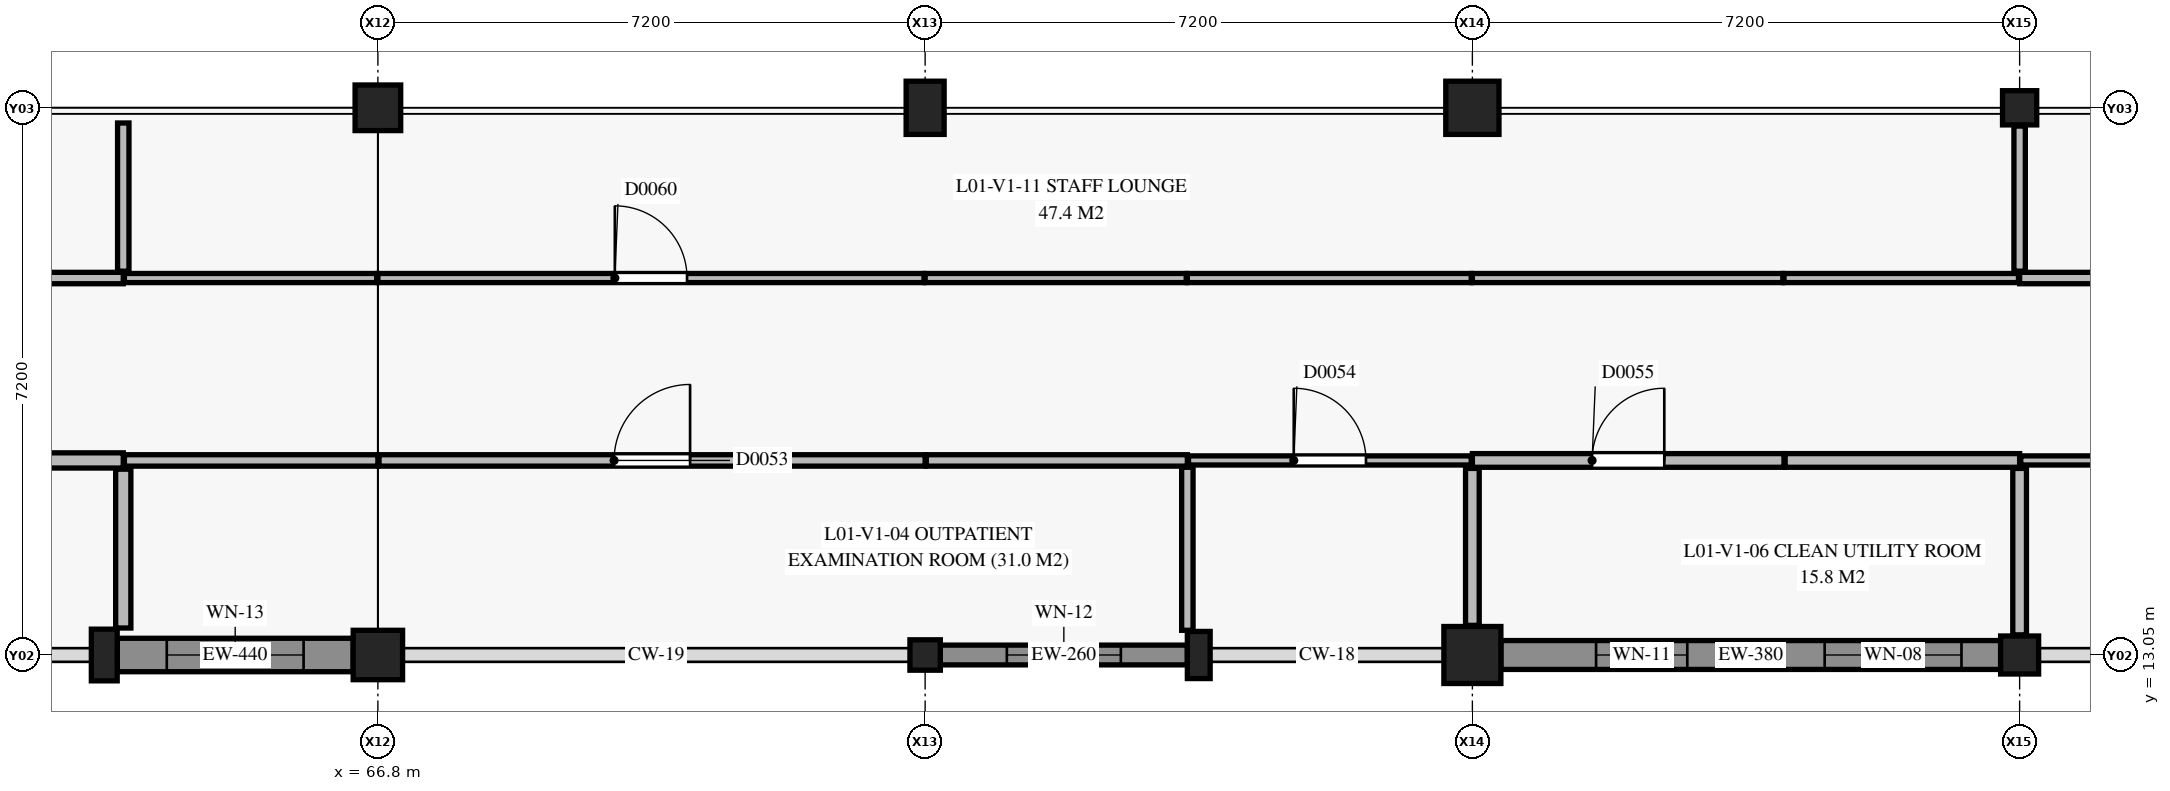
"""IFC4 building model, lengths in metres.
Left out: names, types, materials, properties, quantities, classifications, styles, units other than length and angle.
Written with IfcOpenShell. Run it as: python <this file> out.ifc"""

import sys

from ifc_helpers import new_model, si_unit, direction, frame, frame_2d, origin, origin_2d, place, context, subcontext, project, spatial, rectangle, extrude, element, fill, save


model = new_model("IFC4")
c1 = context("Model", 3, precision=1e-05, world=origin(), true_north=direction((0.0, 1.0)))
c2 = subcontext(c1, "Body", "Model", "MODEL_VIEW")
j1 = project(units=[si_unit("LENGTHUNIT", "METRE"), si_unit("PLANEANGLEUNIT", "RADIAN")], contexts=[c1])
p1 = place(None, origin())
s1 = spatial("IfcSite", under=j1, at=p1, CompositionType="ELEMENT")
p2 = place(p1, origin())
s2 = spatial("IfcBuilding", under=s1, at=p2, CompositionType="ELEMENT")
p3 = place(p2, frame((0.0, 0.0, 4.8)))
s3 = spatial("IfcBuildingStorey", under=s2, at=p3, CompositionType="ELEMENT", Elevation=4.8)
p4 = place(p3, frame((66.8, 13.05, 0.0), z_axis=(0.0, 0.0, 1.0), x_axis=(1.0, 0.0, 0.0)))
e1 = element("IfcColumn", 1, at=p4, inside=s3, PredefinedType="COLUMN", context=c2, shape_type="SweptSolid", body=[
    extrude(rectangle(XDim=0.65, YDim=0.65, at=origin_2d()), origin(), (0.0, 0.0, 1.0), 4.36),
])
p5 = place(p3, frame((66.8, 20.25, 0.0), z_axis=(0.0, 0.0, 1.0), x_axis=(1.0, 0.0, 0.0)))
e2 = element("IfcColumn", 2, at=p5, inside=s3, PredefinedType="COLUMN", context=c2, shape_type="SweptSolid", body=[
    extrude(rectangle(XDim=0.6, YDim=0.6, at=origin_2d()), origin(), (0.0, 0.0, 1.0), 4.05),
])
p6 = place(p3, frame((74.0, 13.05, 0.0), z_axis=(0.0, 0.0, 1.0), x_axis=(1.0, 0.0, 0.0)))
e3 = element("IfcColumn", 3, at=p6, inside=s3, PredefinedType="COLUMN", context=c2, shape_type="SweptSolid", body=[
    extrude(rectangle(XDim=0.4, YDim=0.4, at=origin_2d()), origin(), (0.0, 0.0, 1.0), 4.36),
])
p7 = place(p3, frame((74.0, 20.25, 0.0), z_axis=(0.0, 0.0, 1.0), x_axis=(1.0, 0.0, 0.0)))
e4 = element("IfcColumn", 4, at=p7, inside=s3, PredefinedType="COLUMN", context=c2, shape_type="SweptSolid", body=[
    extrude(rectangle(XDim=0.5, YDim=0.7, at=origin_2d()), origin(), (0.0, 0.0, 1.0), 4.05),
])
p8 = place(p3, frame((81.2, 13.05, 0.0), z_axis=(0.0, 0.0, 1.0), x_axis=(1.0, 0.0, 0.0)))
e5 = element("IfcColumn", 5, at=p8, inside=s3, PredefinedType="COLUMN", context=c2, shape_type="SweptSolid", body=[
    extrude(rectangle(XDim=0.75, YDim=0.75, at=origin_2d()), origin(), (0.0, 0.0, 1.0), 4.36),
])
p9 = place(p3, frame((81.2, 20.25, 0.0), z_axis=(0.0, 0.0, 1.0), x_axis=(1.0, 0.0, 0.0)))
e6 = element("IfcColumn", 6, at=p9, inside=s3, PredefinedType="COLUMN", context=c2, shape_type="SweptSolid", body=[
    extrude(rectangle(XDim=0.7, YDim=0.7, at=origin_2d()), origin(), (0.0, 0.0, 1.0), 4.05),
])
p10 = place(p3, frame((88.4, 13.05, 0.0), z_axis=(0.0, 0.0, 1.0), x_axis=(1.0, 0.0, 0.0)))
e7 = element("IfcColumn", 7, at=p10, inside=s3, PredefinedType="COLUMN", context=c2, shape_type="SweptSolid", body=[
    extrude(rectangle(XDim=0.5, YDim=0.5, at=origin_2d()), origin(), (0.0, 0.0, 1.0), 4.36),
])
p11 = place(p3, frame((88.4, 20.25, 0.0), z_axis=(0.0, 0.0, 1.0), x_axis=(1.0, 0.0, 0.0)))
e8 = element("IfcColumn", 8, at=p11, inside=s3, PredefinedType="COLUMN", context=c2, shape_type="SweptSolid", body=[
    extrude(rectangle(XDim=0.45, YDim=0.45, at=origin_2d()), origin(), (0.0, 0.0, 1.0), 4.05),
])
p12 = place(p3, frame((63.2, 13.05, 0.0), z_axis=(0.0, 0.0, 1.0), x_axis=(1.0, 0.0, 0.0)))
e9 = element("IfcColumn", 9, at=p12, inside=s3, PredefinedType="PILASTER", context=c2, shape_type="SweptSolid", body=[
    extrude(rectangle(XDim=0.34, YDim=0.68, at=origin_2d()), origin(), (0.0, 0.0, 1.0), 4.2),
])
p13 = place(p3, frame((77.6, 13.05, 0.0), z_axis=(0.0, 0.0, 1.0), x_axis=(1.0, 0.0, 0.0)))
e10 = element("IfcColumn", 10, at=p13, inside=s3, PredefinedType="PILASTER", context=c2, shape_type="SweptSolid", body=[
    extrude(rectangle(XDim=0.3, YDim=0.62, at=origin_2d()), origin(), (0.0, 0.0, 1.0), 4.2),
])
p14 = place(p3, frame((88.15, 13.05, 0.0), z_axis=(0.0, 0.0, 1.0), x_axis=(-1.0, 0.0, 0.0)))
e11 = element("IfcWall", 11, at=p14, inside=s3, PredefinedType="USERDEFINED", context=c2, shape_type="SweptSolid", body=[
    extrude(rectangle(XDim=6.575, YDim=0.38, at=frame_2d((3.288, 0.0))), origin(), (0.0, 0.0, 1.0), 3.38),
])
p15 = place(p14, frame((0.515, 0.0, 0.9)))
e12 = element("IfcOpeningElement", 12, at=p15, cuts=e11, PredefinedType="OPENING", context=c2, shape_type="SweptSolid", body=[
    extrude(rectangle(XDim=1.8, YDim=1.8, at=frame_2d((0.9, 0.9))), frame((0.0, 0.2, 0.0), z_axis=(0.0, -1.0, 0.0), x_axis=(1.0, 0.0, 0.0)), (0.0, 0.0, 1.0), 0.4),
])
p16 = place(p14, frame((4.123, 0.0, 0.9)))
e13 = element("IfcOpeningElement", 13, at=p16, cuts=e11, PredefinedType="OPENING", context=c2, shape_type="SweptSolid", body=[
    extrude(rectangle(XDim=1.2, YDim=1.5, at=frame_2d((0.6, 0.75))), frame((0.0, 0.2, 0.0), z_axis=(0.0, -1.0, 0.0), x_axis=(1.0, 0.0, 0.0)), (0.0, 0.0, 1.0), 0.4),
])
p17 = place(p3, frame((77.45, 13.05, 0.0), z_axis=(0.0, 0.0, 1.0), x_axis=(-1.0, 0.0, 0.0)))
e14 = element("IfcWall", 14, at=p17, inside=s3, PredefinedType="SOLIDWALL", context=c2, shape_type="SweptSolid", body=[
    extrude(rectangle(XDim=3.25, YDim=0.26, at=frame_2d((1.625, 0.0))), origin(), (0.0, 0.0, 1.0), 3.38),
])
p18 = place(p17, frame((0.875, 0.0, 0.9)))
e15 = element("IfcOpeningElement", 15, at=p18, cuts=e14, PredefinedType="OPENING", context=c2, shape_type="SweptSolid", body=[
    extrude(rectangle(XDim=1.5, YDim=1.5, at=frame_2d((0.75, 0.75))), frame((0.0, 0.14, 0.0), z_axis=(0.0, -1.0, 0.0), x_axis=(1.0, 0.0, 0.0)), (0.0, 0.0, 1.0), 0.28),
])
p19 = place(p3, frame((66.475, 13.05, 0.0), z_axis=(0.0, 0.0, 1.0), x_axis=(-1.0, 0.0, 0.0)))
e16 = element("IfcWall", 16, at=p19, inside=s3, PredefinedType="USERDEFINED", context=c2, shape_type="SweptSolid", body=[
    extrude(rectangle(XDim=3.105, YDim=0.44, at=frame_2d((1.552, 0.0))), origin(), (0.0, 0.0, 1.0), 3.38),
])
p20 = place(p19, frame((0.653, 0.0, 0.9)))
e17 = element("IfcOpeningElement", 17, at=p20, cuts=e16, PredefinedType="OPENING", context=c2, shape_type="SweptSolid", body=[
    extrude(rectangle(XDim=1.8, YDim=1.5, at=frame_2d((0.9, 0.75))), frame((0.0, 0.23, 0.0), z_axis=(0.0, -1.0, 0.0), x_axis=(1.0, 0.0, 0.0)), (0.0, 0.0, 1.0), 0.46),
])
p21 = place(p3, frame((81.2, 15.61, 0.0), z_axis=(0.0, 0.0, 1.0), x_axis=(1.0, 0.0, 0.0)))
e18 = element("IfcWall", 18, at=p21, inside=s3, PredefinedType="PLUMBINGWALL", context=c2, shape_type="SweptSolid", body=[
    extrude(rectangle(XDim=4.1, YDim=0.18, at=frame_2d((2.05, 0.0))), origin(), (0.0, 0.0, 1.0), 3.95),
])
p22 = place(p21, frame((1.575, 0.0, 0.0)))
e19 = element("IfcOpeningElement", 19, at=p22, cuts=e18, PredefinedType="OPENING", context=c2, shape_type="SweptSolid", body=[
    extrude(rectangle(XDim=0.95, YDim=2.1, at=frame_2d((0.475, 1.05))), frame((0.0, 0.1, 0.0), z_axis=(0.0, -1.0, 0.0), x_axis=(1.0, 0.0, 0.0)), (0.0, 0.0, 1.0), 0.2),
])
p23 = place(p3, frame((85.315, 15.61, 0.0), z_axis=(0.0, 0.0, 1.0), x_axis=(1.0, 0.0, 0.0)))
e20 = element("IfcWall", 20, at=p23, inside=s3, PredefinedType="PLUMBINGWALL", context=c2, shape_type="SweptSolid", body=[
    extrude(rectangle(XDim=3.085, YDim=0.18, at=frame_2d((1.542, 0.0))), origin(), (0.0, 0.0, 1.0), 3.95),
])
p24 = place(p3, frame((59.615, 15.61, 0.0), z_axis=(0.0, 0.0, 1.0), x_axis=(1.0, 0.0, 0.0)))
e21 = element("IfcWall", 21, at=p24, inside=s3, PredefinedType="PARTITIONING", context=c2, shape_type="SweptSolid", body=[
    extrude(rectangle(XDim=3.835, YDim=0.2, at=frame_2d((1.917, 0.0))), origin(), (0.0, 0.0, 1.0), 3.95),
])
p25 = place(p24, frame((1.393, 0.0, 0.0)))
e22 = element("IfcOpeningElement", 22, at=p25, cuts=e21, PredefinedType="OPENING", context=c2, shape_type="SweptSolid", body=[
    extrude(rectangle(XDim=1.05, YDim=2.15, at=frame_2d((0.525, 1.075))), frame((0.0, 0.11, 0.0), z_axis=(0.0, -1.0, 0.0), x_axis=(1.0, 0.0, 0.0)), (0.0, 0.0, 1.0), 0.22),
])
p26 = place(p3, frame((63.465, 15.61, 0.0), z_axis=(0.0, 0.0, 1.0), x_axis=(1.0, 0.0, 0.0)))
e23 = element("IfcWall", 23, at=p26, inside=s3, PredefinedType="PARTITIONING", context=c2, shape_type="SweptSolid", body=[
    extrude(rectangle(XDim=3.335, YDim=0.15, at=frame_2d((1.667, 0.0))), origin(), (0.0, 0.0, 1.0), 3.95),
])
p27 = place(p3, frame((66.815, 15.61, 0.0), z_axis=(0.0, 0.0, 1.0), x_axis=(1.0, 0.0, 0.0)))
e24 = element("IfcWall", 24, at=p27, inside=s3, PredefinedType="PARTITIONING", context=c2, shape_type="SweptSolid", body=[
    extrude(rectangle(XDim=7.185, YDim=0.15, at=frame_2d((3.593, 0.0))), origin(), (0.0, 0.0, 1.0), 3.95),
])
p28 = place(p27, frame((3.093, 0.0, 0.0)))
e25 = element("IfcOpeningElement", 25, at=p28, cuts=e24, PredefinedType="OPENING", context=c2, shape_type="SweptSolid", body=[
    extrude(rectangle(XDim=1.0, YDim=2.15, at=frame_2d((0.5, 1.075))), frame((0.0, 0.085, 0.0), z_axis=(0.0, -1.0, 0.0), x_axis=(1.0, 0.0, 0.0)), (0.0, 0.0, 1.0), 0.17),
])
p29 = place(p3, frame((74.015, 15.61, 0.0), z_axis=(0.0, 0.0, 1.0), x_axis=(1.0, 0.0, 0.0)))
e26 = element("IfcWall", 26, at=p29, inside=s3, PredefinedType="PARTITIONING", context=c2, shape_type="SweptSolid", body=[
    extrude(rectangle(XDim=3.435, YDim=0.15, at=frame_2d((1.718, 0.0))), origin(), (0.0, 0.0, 1.0), 3.95),
])
p30 = place(p3, frame((59.6, 18.01, 0.0), z_axis=(0.0, 0.0, 1.0), x_axis=(1.0, 0.0, 0.0)))
e27 = element("IfcWall", 27, at=p30, inside=s3, PredefinedType="PARTITIONING", context=c2, shape_type="SweptSolid", body=[
    extrude(rectangle(XDim=3.85, YDim=0.15, at=frame_2d((1.925, 0.0))), origin(), (0.0, 0.0, 1.0), 3.95),
])
p31 = place(p3, frame((88.4, 18.01, 0.0), z_axis=(0.0, 0.0, 1.0), x_axis=(1.0, 0.0, 0.0)))
e28 = element("IfcWall", 28, at=p31, inside=s3, PredefinedType="PARTITIONING", context=c2, shape_type="SweptSolid", body=[
    extrude(rectangle(XDim=7.185, YDim=0.15, at=frame_2d((3.593, 0.0))), origin(), (0.0, 0.0, 1.0), 3.95),
])
p32 = place(p31, frame((2.792, 0.0, 0.0)))
e29 = element("IfcOpeningElement", 29, at=p32, cuts=e28, PredefinedType="OPENING", context=c2, shape_type="SweptSolid", body=[
    extrude(rectangle(XDim=1.6, YDim=2.25, at=frame_2d((0.8, 1.125))), frame((0.0, 0.085, 0.0), z_axis=(0.0, -1.0, 0.0), x_axis=(1.0, 0.0, 0.0)), (0.0, 0.0, 1.0), 0.17),
])
p33 = place(p3, frame((77.465, 15.61, 0.0), z_axis=(0.0, 0.0, 1.0), x_axis=(1.0, 0.0, 0.0)))
e30 = element("IfcWall", 30, at=p33, inside=s3, PredefinedType="PARTITIONING", context=c2, shape_type="SweptSolid", body=[
    extrude(rectangle(XDim=3.72, YDim=0.12, at=frame_2d((1.86, 0.0))), origin(), (0.0, 0.0, 1.0), 3.95),
])
p34 = place(p33, frame((1.385, 0.0, 0.0)))
e31 = element("IfcOpeningElement", 31, at=p34, cuts=e30, PredefinedType="OPENING", context=c2, shape_type="SweptSolid", body=[
    extrude(rectangle(XDim=0.95, YDim=2.1, at=frame_2d((0.475, 1.05))), frame((0.0, 0.07, 0.0), z_axis=(0.0, -1.0, 0.0), x_axis=(1.0, 0.0, 0.0)), (0.0, 0.0, 1.0), 0.14),
])
p35 = place(p3, frame((88.415, 15.61, 0.0), z_axis=(0.0, 0.0, 1.0), x_axis=(1.0, 0.0, 0.0)))
e32 = element("IfcWall", 32, at=p35, inside=s3, PredefinedType="PARTITIONING", context=c2, shape_type="SweptSolid", body=[
    extrude(rectangle(XDim=7.185, YDim=0.12, at=frame_2d((3.593, 0.0))), origin(), (0.0, 0.0, 1.0), 3.95),
])
p36 = place(p35, frame((2.968, 0.0, 0.0)))
e33 = element("IfcOpeningElement", 33, at=p36, cuts=e32, PredefinedType="OPENING", context=c2, shape_type="SweptSolid", body=[
    extrude(rectangle(XDim=1.25, YDim=2.15, at=frame_2d((0.625, 1.075))), frame((0.0, 0.07, 0.0), z_axis=(0.0, -1.0, 0.0), x_axis=(1.0, 0.0, 0.0)), (0.0, 0.0, 1.0), 0.14),
])
p37 = place(p3, frame((85.3, 18.01, 0.0), z_axis=(0.0, 0.0, 1.0), x_axis=(1.0, 0.0, 0.0)))
e34 = element("IfcWall", 34, at=p37, inside=s3, PredefinedType="PARTITIONING", context=c2, shape_type="SweptSolid", body=[
    extrude(rectangle(XDim=3.085, YDim=0.12, at=frame_2d((1.542, 0.0))), origin(), (0.0, 0.0, 1.0), 3.95),
])
p38 = place(p3, frame((81.2, 18.01, 0.0), z_axis=(0.0, 0.0, 1.0), x_axis=(1.0, 0.0, 0.0)))
e35 = element("IfcWall", 35, at=p38, inside=s3, PredefinedType="PARTITIONING", context=c2, shape_type="SweptSolid", body=[
    extrude(rectangle(XDim=4.085, YDim=0.12, at=frame_2d((2.042, 0.0))), origin(), (0.0, 0.0, 1.0), 3.95),
])
p39 = place(p3, frame((77.45, 18.01, 0.0), z_axis=(0.0, 0.0, 1.0), x_axis=(1.0, 0.0, 0.0)))
e36 = element("IfcWall", 36, at=p39, inside=s3, PredefinedType="PARTITIONING", context=c2, shape_type="SweptSolid", body=[
    extrude(rectangle(XDim=3.735, YDim=0.12, at=frame_2d((1.868, 0.0))), origin(), (0.0, 0.0, 1.0), 3.95),
])
p40 = place(p3, frame((74.0, 18.01, 0.0), z_axis=(0.0, 0.0, 1.0), x_axis=(1.0, 0.0, 0.0)))
e37 = element("IfcWall", 37, at=p40, inside=s3, PredefinedType="PARTITIONING", context=c2, shape_type="SweptSolid", body=[
    extrude(rectangle(XDim=3.435, YDim=0.12, at=frame_2d((1.718, 0.0))), origin(), (0.0, 0.0, 1.0), 3.95),
])
p41 = place(p3, frame((66.8, 18.01, 0.0), z_axis=(0.0, 0.0, 1.0), x_axis=(1.0, 0.0, 0.0)))
e38 = element("IfcWall", 38, at=p41, inside=s3, PredefinedType="PARTITIONING", context=c2, shape_type="SweptSolid", body=[
    extrude(rectangle(XDim=7.185, YDim=0.12, at=frame_2d((3.593, 0.0))), origin(), (0.0, 0.0, 1.0), 3.95),
])
p42 = place(p41, frame((3.117, 0.0, 0.0)))
e39 = element("IfcOpeningElement", 39, at=p42, cuts=e38, PredefinedType="OPENING", context=c2, shape_type="SweptSolid", body=[
    extrude(rectangle(XDim=0.95, YDim=2.1, at=frame_2d((0.475, 1.05))), frame((0.0, 0.07, 0.0), z_axis=(0.0, -1.0, 0.0), x_axis=(1.0, 0.0, 0.0)), (0.0, 0.0, 1.0), 0.14),
])
p43 = place(p3, frame((63.465, 18.01, 0.0), z_axis=(0.0, 0.0, 1.0), x_axis=(1.0, 0.0, 0.0)))
e40 = element("IfcWall", 40, at=p43, inside=s3, PredefinedType="PARTITIONING", context=c2, shape_type="SweptSolid", body=[
    extrude(rectangle(XDim=3.32, YDim=0.12, at=frame_2d((1.66, 0.0))), origin(), (0.0, 0.0, 1.0), 3.95),
])
p44 = place(p3, frame((81.2, 13.44, 0.0), z_axis=(0.0, 0.0, 1.0), x_axis=(0.0, 1.0, 0.0)))
e41 = element("IfcWall", 41, at=p44, inside=s3, PredefinedType="PLUMBINGWALL", context=c2, shape_type="SweptSolid", body=[
    extrude(rectangle(XDim=2.065, YDim=0.18, at=frame_2d((1.032, 0.0))), origin(), (0.0, 0.0, 1.0), 3.95),
])
p45 = place(p3, frame((88.4, 13.315, 0.0), z_axis=(0.0, 0.0, 1.0), x_axis=(0.0, 1.0, 0.0)))
e42 = element("IfcWall", 42, at=p45, inside=s3, PredefinedType="PLUMBINGWALL", context=c2, shape_type="SweptSolid", body=[
    extrude(rectangle(XDim=2.19, YDim=0.18, at=frame_2d((1.095, 0.0))), origin(), (0.0, 0.0, 1.0), 3.95),
])
p46 = place(p3, frame((63.45, 13.405, 0.0), z_axis=(0.0, 0.0, 1.0), x_axis=(0.0, 1.0, 0.0)))
e43 = element("IfcWall", 43, at=p46, inside=s3, PredefinedType="PARTITIONING", context=c2, shape_type="SweptSolid", body=[
    extrude(rectangle(XDim=2.09, YDim=0.2, at=frame_2d((1.045, 0.0))), origin(), (0.0, 0.0, 1.0), 3.95),
])
p47 = place(p3, frame((77.45, 13.375, 0.0), z_axis=(0.0, 0.0, 1.0), x_axis=(0.0, 1.0, 0.0)))
e44 = element("IfcWall", 44, at=p47, inside=s3, PredefinedType="PARTITIONING", context=c2, shape_type="SweptSolid", body=[
    extrude(rectangle(XDim=2.145, YDim=0.15, at=frame_2d((1.073, 0.0))), origin(), (0.0, 0.0, 1.0), 3.95),
])
p48 = place(p3, frame((63.45, 18.1, 0.0), z_axis=(0.0, 0.0, 1.0), x_axis=(0.0, 1.0, 0.0)))
e45 = element("IfcWall", 45, at=p48, inside=s3, PredefinedType="PARTITIONING", context=c2, shape_type="SweptSolid", body=[
    extrude(rectangle(XDim=1.95, YDim=0.15, at=frame_2d((0.975, 0.0))), origin(), (0.0, 0.0, 1.0), 3.95),
])
p49 = place(p3, frame((88.4, 18.1, 0.0), z_axis=(0.0, 0.0, 1.0), x_axis=(0.0, 1.0, 0.0)))
e46 = element("IfcWall", 46, at=p49, inside=s3, PredefinedType="PARTITIONING", context=c2, shape_type="SweptSolid", body=[
    extrude(rectangle(XDim=1.91, YDim=0.15, at=frame_2d((0.955, 0.0))), origin(), (0.0, 0.0, 1.0), 3.95),
])
p50 = place(p15, origin())
e47 = element("IfcWindow", 47, at=p50, inside=s3, PartitioningType="SINGLE_PANEL", PredefinedType="WINDOW", context=c2, shape_type="SweptSolid", body=[
    extrude(rectangle(XDim=1.8, YDim=1.8, at=frame_2d((0.9, 0.9))), frame((0.0, 0.03, 0.0), z_axis=(0.0, -1.0, 0.0), x_axis=(1.0, 0.0, 0.0)), (0.0, 0.0, 1.0), 0.06),
])
fill(e12, e47)
p51 = place(p16, origin())
e48 = element("IfcWindow", 48, at=p51, inside=s3, PartitioningType="SINGLE_PANEL", PredefinedType="WINDOW", context=c2, shape_type="SweptSolid", body=[
    extrude(rectangle(XDim=1.2, YDim=1.5, at=frame_2d((0.6, 0.75))), frame((0.0, 0.03, 0.0), z_axis=(0.0, -1.0, 0.0), x_axis=(1.0, 0.0, 0.0)), (0.0, 0.0, 1.0), 0.06),
])
fill(e13, e48)
p52 = place(p18, origin())
e49 = element("IfcWindow", 49, at=p52, inside=s3, PartitioningType="SINGLE_PANEL", PredefinedType="WINDOW", context=c2, shape_type="SweptSolid", body=[
    extrude(rectangle(XDim=1.5, YDim=1.5, at=frame_2d((0.75, 0.75))), frame((0.0, 0.03, 0.0), z_axis=(0.0, -1.0, 0.0), x_axis=(1.0, 0.0, 0.0)), (0.0, 0.0, 1.0), 0.06),
])
fill(e15, e49)
p53 = place(p20, origin())
e50 = element("IfcWindow", 50, at=p53, inside=s3, PartitioningType="SINGLE_PANEL", PredefinedType="WINDOW", context=c2, shape_type="SweptSolid", body=[
    extrude(rectangle(XDim=1.8, YDim=1.5, at=frame_2d((0.9, 0.75))), frame((0.0, 0.03, 0.0), z_axis=(0.0, -1.0, 0.0), x_axis=(1.0, 0.0, 0.0)), (0.0, 0.0, 1.0), 0.06),
])
fill(e17, e50)
p54 = place(p28, origin())
e51 = element("IfcDoor", 51, at=p54, inside=s3, OperationType="SINGLE_SWING_RIGHT", PredefinedType="DOOR", context=c2, shape_type="SweptSolid", body=[
    extrude(rectangle(XDim=1.0, YDim=2.15, at=frame_2d((0.5, 1.075))), frame((0.0, 0.025, 0.0), z_axis=(0.0, -1.0, 0.0), x_axis=(1.0, 0.0, 0.0)), (0.0, 0.0, 1.0), 0.05),
])
fill(e25, e51)
p55 = place(p34, origin())
e52 = element("IfcDoor", 52, at=p55, inside=s3, OperationType="SINGLE_SWING_LEFT", PredefinedType="DOOR", context=c2, shape_type="SweptSolid", body=[
    extrude(rectangle(XDim=0.95, YDim=2.1, at=frame_2d((0.475, 1.05))), frame((0.0, 0.025, 0.0), z_axis=(0.0, -1.0, 0.0), x_axis=(1.0, 0.0, 0.0)), (0.0, 0.0, 1.0), 0.05),
])
fill(e31, e52)
p56 = place(p22, origin())
e53 = element("IfcDoor", 53, at=p56, inside=s3, OperationType="SINGLE_SWING_RIGHT", PredefinedType="DOOR", context=c2, shape_type="SweptSolid", body=[
    extrude(rectangle(XDim=0.95, YDim=2.1, at=frame_2d((0.475, 1.05))), frame((0.0, 0.025, 0.0), z_axis=(0.0, -1.0, 0.0), x_axis=(1.0, 0.0, 0.0)), (0.0, 0.0, 1.0), 0.05),
])
fill(e19, e53)
p57 = place(p42, origin())
e54 = element("IfcDoor", 54, at=p57, inside=s3, OperationType="SINGLE_SWING_LEFT", PredefinedType="DOOR", context=c2, shape_type="SweptSolid", body=[
    extrude(rectangle(XDim=0.95, YDim=2.1, at=frame_2d((0.475, 1.05))), frame((0.0, 0.025, 0.0), z_axis=(0.0, -1.0, 0.0), x_axis=(1.0, 0.0, 0.0)), (0.0, 0.0, 1.0), 0.05),
])
fill(e39, e54)
save(model, sys.argv[1])
